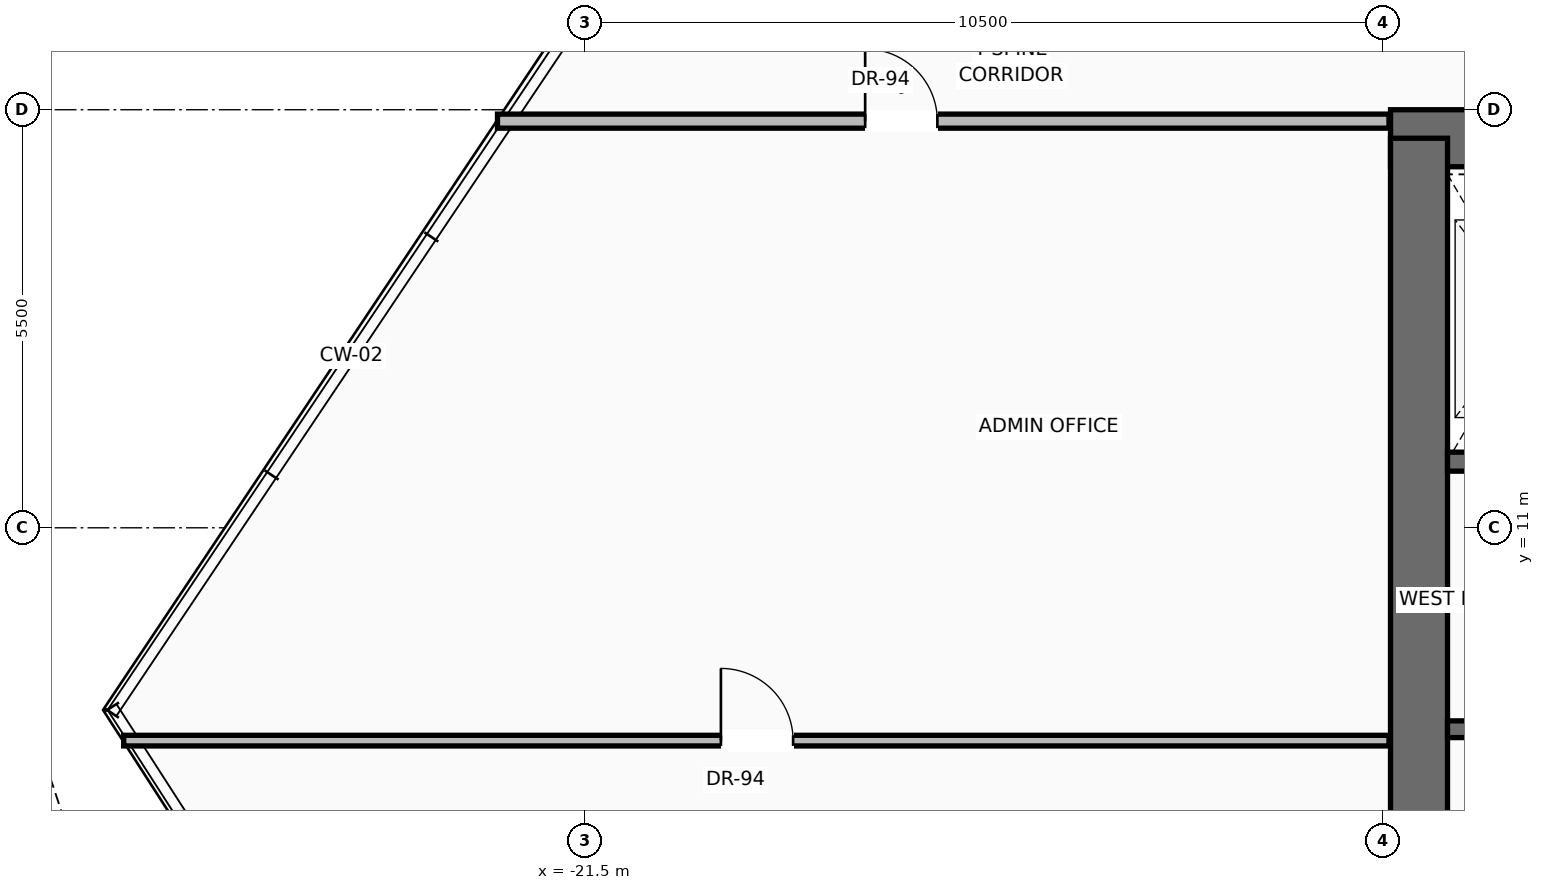
"""IFC4 building model, lengths in metres.
Left out: names, types, materials, properties, quantities, classifications, styles, units other than length and angle.
Written with IfcOpenShell. Run it as: python <this file> out.ifc"""

import sys

from ifc_helpers import new_model, si_unit, direction, frame, frame_2d, origin, place, context, subcontext, project, spatial, rectangle, extrude, source, transform, mapped, element, fill, save


model = new_model("IFC4")
c1 = context("Model", 3, precision=1e-05, world=origin(), true_north=direction((0.0, 1.0)))
c2 = subcontext(c1, "Body", "Model", "MODEL_VIEW")
j1 = project(units=[si_unit("LENGTHUNIT", "METRE"), si_unit("PLANEANGLEUNIT", "RADIAN")], contexts=[c1])
p1 = place(None, origin())
s1 = spatial("IfcSite", under=j1, at=p1, CompositionType="ELEMENT")
p2 = place(p1, origin())
s2 = spatial("IfcBuilding", under=s1, at=p2, CompositionType="ELEMENT")
p3 = place(p2, frame((0.0, 0.0, 106.2)))
s3 = spatial("IfcBuildingStorey", under=s2, at=p3, CompositionType="ELEMENT", Elevation=106.2)
p4 = place(p3, frame((-10.9, 16.125, 0.0), z_axis=(0.0, 0.0, 1.0), x_axis=(1.0, 0.0, 0.0)))
e1 = element("IfcWall", 1, at=p4, inside=s3, PredefinedType="SHEAR", context=c2, shape_type="SweptSolid", body=[
    extrude(rectangle(XDim=21.8, YDim=0.75, at=frame_2d((10.9, 0.0))), origin(), (0.0, 0.0, 1.0), 3.45),
])
p5 = place(p4, frame((3.47, 0.0, 0.0)))
e2 = element("IfcOpeningElement", 2, at=p5, cuts=e1, PredefinedType="OPENING", context=c2, shape_type="SweptSolid", body=[
    extrude(rectangle(XDim=1.3, YDim=2.3, at=frame_2d((0.65, 1.15))), frame((0.0, 0.385, 0.0), z_axis=(0.0, -1.0, 0.0), x_axis=(1.0, 0.0, 0.0)), (0.0, 0.0, 1.0), 0.77),
])
p6 = place(p4, frame((9.9, 0.0, 0.0)))
e3 = element("IfcOpeningElement", 3, at=p6, cuts=e1, PredefinedType="OPENING", context=c2, shape_type="SweptSolid", body=[
    extrude(rectangle(XDim=2.0, YDim=2.4, at=frame_2d((1.0, 1.2))), frame((0.0, 0.385, 0.0), z_axis=(0.0, -1.0, 0.0), x_axis=(1.0, 0.0, 0.0)), (0.0, 0.0, 1.0), 0.77),
])
p7 = place(p3, frame((-10.525, 0.475, 0.0), z_axis=(0.0, 0.0, 1.0), x_axis=(0.0, 1.0, 0.0)))
e4 = element("IfcWall", 4, at=p7, inside=s3, PredefinedType="SHEAR", context=c2, shape_type="SweptSolid", body=[
    extrude(rectangle(XDim=15.65, YDim=0.75, at=frame_2d((7.825, 0.0))), origin(), (0.0, 0.0, 1.0), 3.45),
])
p8 = place(p3, frame((-5.5, 8.35, 0.0), z_axis=(0.0, 0.0, 1.0), x_axis=(-1.0, 0.0, 0.0)))
e5 = element("IfcWall", 5, at=p8, inside=s3, PredefinedType="SOLIDWALL", context=c2, shape_type="SweptSolid", body=[
    extrude(rectangle(XDim=4.65, YDim=0.22, at=frame_2d((2.325, 0.0))), origin(), (0.0, 0.0, 1.0), 3.45),
])
p9 = place(p8, frame((2.5, 0.0, 0.0)))
e6 = element("IfcOpeningElement", 6, at=p9, cuts=e5, PredefinedType="OPENING", context=c2, shape_type="SweptSolid", body=[
    extrude(rectangle(XDim=1.15, YDim=2.2, at=frame_2d((0.575, 1.1))), frame((0.0, 0.12, 0.0), z_axis=(0.0, -1.0, 0.0), x_axis=(1.0, 0.0, 0.0)), (0.0, 0.0, 1.0), 0.24),
])
p10 = place(p3, frame((-5.5, 11.87, 0.0), z_axis=(0.0, 0.0, 1.0), x_axis=(-1.0, 0.0, 0.0)))
e7 = element("IfcWall", 7, at=p10, inside=s3, PredefinedType="SOLIDWALL", context=c2, shape_type="SweptSolid", body=[
    extrude(rectangle(XDim=4.65, YDim=0.25, at=frame_2d((2.325, 0.0))), origin(), (0.0, 0.0, 1.0), 3.45),
])
p11 = place(p10, frame((2.95, 0.0, 0.0)))
e8 = element("IfcOpeningElement", 8, at=p11, cuts=e7, PredefinedType="OPENING", context=c2, shape_type="SweptSolid", body=[
    extrude(rectangle(XDim=1.2, YDim=2.25, at=frame_2d((0.6, 1.125))), frame((0.0, 0.135, 0.0), z_axis=(0.0, -1.0, 0.0), x_axis=(1.0, 0.0, 0.0)), (0.0, 0.0, 1.0), 0.27),
])
p12 = place(p3, frame((-22.649, 16.35, 0.0), z_axis=(0.0, 0.0, 1.0), x_axis=(1.0, 0.0, 0.0)))
e9 = element("IfcWall", 9, at=p12, inside=s3, PredefinedType="PARTITIONING", context=c2, shape_type="SweptSolid", body=[
    extrude(rectangle(XDim=11.729, YDim=0.185, at=frame_2d((5.865, 0.0))), origin(), (0.0, 0.0, 1.0), 2.747),
])
p13 = place(p12, frame((4.837, 0.0, 0.0)))
e10 = element("IfcOpeningElement", 10, at=p13, cuts=e9, PredefinedType="OPENING", context=c2, shape_type="SweptSolid", body=[
    extrude(rectangle(XDim=0.95, YDim=2.2, at=frame_2d((0.475, 1.1))), frame((0.0, 0.103, 0.0), z_axis=(0.0, -1.0, 0.0), x_axis=(1.0, 0.0, 0.0)), (0.0, 0.0, 1.0), 0.205),
])
p14 = place(p3, frame((-27.568, 8.2, 0.0), z_axis=(0.0, 0.0, 1.0), x_axis=(1.0, 0.0, 0.0)))
e11 = element("IfcWall", 11, at=p14, inside=s3, PredefinedType="PARTITIONING", context=c2, shape_type="SweptSolid", body=[
    extrude(rectangle(XDim=16.648, YDim=0.14, at=frame_2d((8.324, 0.0))), origin(), (0.0, 0.0, 1.0), 3.442),
])
p15 = place(p14, frame((7.858, 0.0, 0.0)))
e12 = element("IfcOpeningElement", 12, at=p15, cuts=e11, PredefinedType="OPENING", context=c2, shape_type="SweptSolid", body=[
    extrude(rectangle(XDim=0.95, YDim=2.2, at=frame_2d((0.475, 1.1))), frame((0.0, 0.08, 0.0), z_axis=(0.0, -1.0, 0.0), x_axis=(1.0, 0.0, 0.0)), (0.0, 0.0, 1.0), 0.16),
])
m1 = source(origin(), c2, "Body", "SweptSolid", [
    extrude(rectangle(XDim=0.95, YDim=2.2, at=frame_2d((0.475, 1.1))), frame((0.0, 0.025, 0.0), z_axis=(0.0, -1.0, 0.0), x_axis=(1.0, 0.0, 0.0)), (0.0, 0.0, 1.0), 0.05),
])
p16 = place(p13, origin())
e13 = element("IfcDoor", 13, at=p16, inside=s3, OperationType="SINGLE_SWING_LEFT", PredefinedType="DOOR", context=c2, shape_type="MappedRepresentation", body=[
    mapped(m1, transform((0.0, 0.0, 0.0), scale=1.0)),
])
fill(e10, e13)
p17 = place(p15, origin())
e14 = element("IfcDoor", 14, at=p17, inside=s3, OperationType="SINGLE_SWING_LEFT", PredefinedType="DOOR", context=c2, shape_type="MappedRepresentation", body=[
    mapped(m1, transform((0.0, 0.0, 0.0), scale=1.0)),
])
fill(e12, e14)
save(model, sys.argv[1])
